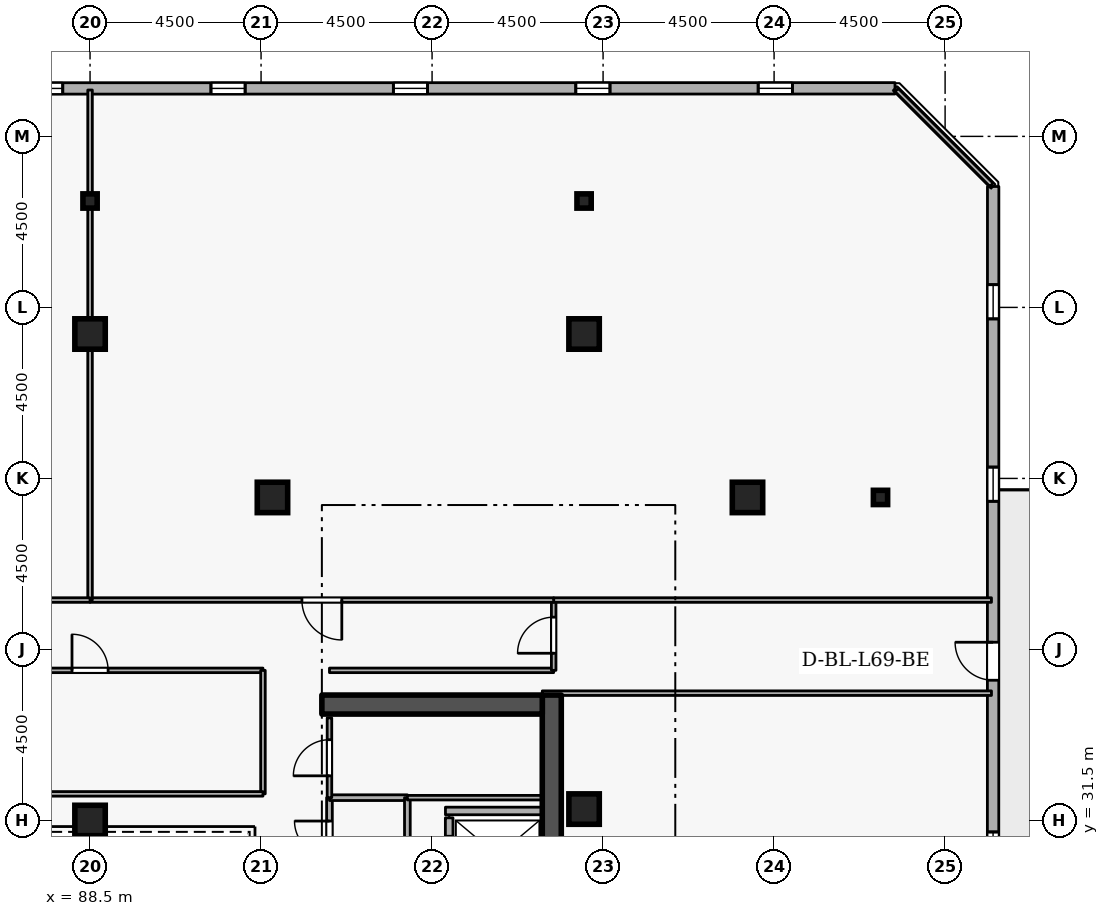
"""IFC4 building model, lengths in metres.
Left out: names, types, materials, properties, quantities, classifications, styles, units other than length and angle.
Written with IfcOpenShell. Run it as: python <this file> out.ifc"""

import sys

from ifc_helpers import new_model, si_unit, direction, frame, frame_2d, origin, origin_2d, place, context, subcontext, project, spatial, rectangle, i_section, extrude, element, fill, save


model = new_model("IFC4")
c1 = context("Model", 3, precision=1e-05, world=origin(), true_north=direction((0.0, 1.0)))
c2 = subcontext(c1, "Body", "Model", "MODEL_VIEW")
j1 = project(units=[si_unit("LENGTHUNIT", "METRE"), si_unit("PLANEANGLEUNIT", "RADIAN")], contexts=[c1])
p1 = place(None, origin())
s1 = spatial("IfcSite", under=j1, at=p1, CompositionType="ELEMENT")
p2 = place(p1, origin())
s2 = spatial("IfcBuilding", under=s1, at=p2, CompositionType="ELEMENT")
p3 = place(p2, frame((0.0, 0.0, 258.3)))
s3 = spatial("IfcBuildingStorey", under=s2, at=p3, CompositionType="ELEMENT", Elevation=258.3)
p4 = place(p3, frame((100.65, 19.2, 0.0), z_axis=(0.0, 0.0, 1.0), x_axis=(0.0, 1.0, 0.0)))
e1 = element("IfcWall", 1, at=p4, inside=s3, PredefinedType="SHEAR", context=c2, shape_type="SweptSolid", body=[
    extrude(rectangle(XDim=15.6, YDim=0.5, at=frame_2d((7.8, 0.0))), origin(), (0.0, 0.0, 1.0), 3.6),
])
p5 = place(p3, frame((94.6, 34.55, 0.0), z_axis=(0.0, 0.0, 1.0), x_axis=(1.0, 0.0, 0.0)))
e2 = element("IfcWall", 2, at=p5, inside=s3, PredefinedType="SHEAR", context=c2, shape_type="SweptSolid", body=[
    extrude(rectangle(XDim=5.8, YDim=0.5, at=frame_2d((2.9, 0.0))), origin(), (0.0, 0.0, 1.0), 3.6),
])
for number, where, z_axis, x_axis in (
    (3, (105.8, 40.0, 0.0), (0.0, 0.0, 1.0), (1.0, 0.0, 0.0)),
    (4, (101.5, 44.3, 0.0), (0.0, 0.0, 1.0), (1.0, 0.0, 0.0)),
    (5, (88.5, 44.3, 0.0), (0.0, 0.0, 1.0), (1.0, 0.0, 0.0)),
    (6, (93.3, 40.0, 0.0), (0.0, 0.0, 1.0), (1.0, 0.0, 0.0)),
    (7, (101.5, 31.8, 0.0), (0.0, 0.0, 1.0), (1.0, 0.0, 0.0)),
    (8, (88.5, 31.5, 0.0), (0.0, 0.0, 1.0), (1.0, 0.0, 0.0)),
):
    element("IfcColumn", number, at=place(p3, frame(where, z_axis=z_axis, x_axis=x_axis)), inside=s3, PredefinedType="COLUMN", context=c2, shape_type="SweptSolid", body=[
        extrude(rectangle(XDim=0.8, YDim=0.8, at=origin_2d()), origin(), (0.0, 0.0, 1.0), 3.6),
    ])
for number, where, z_axis, x_axis in (
    (9, (109.3, 40.0, 0.0), (0.0, 0.0, 1.0), (1.0, 0.0, 0.0)),
    (10, (101.5, 47.8, 0.0), (0.0, 0.0, 1.0), (1.0, 0.0, 0.0)),
    (11, (88.5, 47.8, 0.0), (0.0, 0.0, 1.0), (1.0, 0.0, 0.0)),
):
    element("IfcColumn", number, at=place(p3, frame(where, z_axis=z_axis, x_axis=x_axis)), inside=s3, PredefinedType="COLUMN", context=c2, shape_type="SweptSolid", body=[
        extrude(i_section(OverallWidth=0.375, OverallDepth=0.375, WebThickness=0.017, FlangeThickness=0.027, FilletRadius=0.015, at=origin_2d()), origin(), (0.0, 0.0, 1.0), 3.6),
    ])
p6 = place(p3, frame((112.26, 13.198, 0.0), z_axis=(0.0, 0.0, 1.0), x_axis=(0.000132597301, 0.999999991209, 0.0)))
e12 = element("IfcWall", 12, at=p6, inside=s3, PredefinedType="STANDARD", context=c2, shape_type="SweptSolid", body=[
    extrude(rectangle(XDim=34.983, YDim=0.3, at=frame_2d((17.492, 0.0))), origin(), (0.0, 0.0, 1.0), 2.7),
])
p7 = place(p6, frame((21.992, 0.0, 0.0)))
e13 = element("IfcOpeningElement", 13, at=p7, cuts=e12, PredefinedType="OPENING", context=c2, shape_type="SweptSolid", body=[
    extrude(rectangle(XDim=1.0, YDim=2.08, at=frame_2d((0.5, 1.04))), frame((0.0, 0.16, 0.0), z_axis=(0.0, -1.0, 0.0), x_axis=(1.0, 0.0, 0.0)), (0.0, 0.0, 1.0), 0.32),
])
p8 = place(p6, frame((7.5, 0.0, 0.72)))
e14 = element("IfcOpeningElement", 14, at=p8, cuts=e12, PredefinedType="OPENING", context=c2, shape_type="SweptSolid", body=[
    extrude(rectangle(XDim=0.9, YDim=1.75, at=frame_2d((0.45, 0.875))), frame((0.0, 0.16, 0.0), z_axis=(0.0, -1.0, 0.0), x_axis=(1.0, 0.0, 0.0)), (0.0, 0.0, 1.0), 0.32),
])
p9 = place(p6, frame((12.3, 0.0, 0.72)))
e15 = element("IfcOpeningElement", 15, at=p9, cuts=e12, PredefinedType="OPENING", context=c2, shape_type="SweptSolid", body=[
    extrude(rectangle(XDim=0.9, YDim=1.75, at=frame_2d((0.45, 0.875))), frame((0.0, 0.16, 0.0), z_axis=(0.0, -1.0, 0.0), x_axis=(1.0, 0.0, 0.0)), (0.0, 0.0, 1.0), 0.32),
])
p10 = place(p6, frame((17.1, 0.0, 0.72)))
e16 = element("IfcOpeningElement", 16, at=p10, cuts=e12, PredefinedType="OPENING", context=c2, shape_type="SweptSolid", body=[
    extrude(rectangle(XDim=0.9, YDim=1.75, at=frame_2d((0.45, 0.875))), frame((0.0, 0.16, 0.0), z_axis=(0.0, -1.0, 0.0), x_axis=(1.0, 0.0, 0.0)), (0.0, 0.0, 1.0), 0.32),
])
p11 = place(p6, frame((26.7, 0.0, 0.72)))
e17 = element("IfcOpeningElement", 17, at=p11, cuts=e12, PredefinedType="OPENING", context=c2, shape_type="SweptSolid", body=[
    extrude(rectangle(XDim=0.9, YDim=1.75, at=frame_2d((0.45, 0.875))), frame((0.0, 0.16, 0.0), z_axis=(0.0, -1.0, 0.0), x_axis=(1.0, 0.0, 0.0)), (0.0, 0.0, 1.0), 0.32),
])
p12 = place(p6, frame((31.5, 0.0, 0.72)))
e18 = element("IfcOpeningElement", 18, at=p12, cuts=e12, PredefinedType="OPENING", context=c2, shape_type="SweptSolid", body=[
    extrude(rectangle(XDim=0.9, YDim=1.75, at=frame_2d((0.45, 0.875))), frame((0.0, 0.16, 0.0), z_axis=(0.0, -1.0, 0.0), x_axis=(1.0, 0.0, 0.0)), (0.0, 0.0, 1.0), 0.32),
])
p13 = place(p3, frame((109.681, 50.765, 0.0), z_axis=(0.0, 0.0, 1.0), x_axis=(-0.999999991209, -0.000132597301, 0.0)))
e19 = element("IfcWall", 19, at=p13, inside=s3, PredefinedType="STANDARD", context=c2, shape_type="SweptSolid", body=[
    extrude(rectangle(XDim=34.983, YDim=0.3, at=frame_2d((17.492, 0.0))), origin(), (0.0, 0.0, 1.0), 2.7),
])
p14 = place(p13, frame((2.7, 0.0, 0.72)))
e20 = element("IfcOpeningElement", 20, at=p14, cuts=e19, PredefinedType="OPENING", context=c2, shape_type="SweptSolid", body=[
    extrude(rectangle(XDim=0.9, YDim=1.75, at=frame_2d((0.45, 0.875))), frame((0.0, 0.16, 0.0), z_axis=(0.0, -1.0, 0.0), x_axis=(1.0, 0.0, 0.0)), (0.0, 0.0, 1.0), 0.32),
])
p15 = place(p13, frame((7.5, 0.0, 0.72)))
e21 = element("IfcOpeningElement", 21, at=p15, cuts=e19, PredefinedType="OPENING", context=c2, shape_type="SweptSolid", body=[
    extrude(rectangle(XDim=0.9, YDim=1.75, at=frame_2d((0.45, 0.875))), frame((0.0, 0.16, 0.0), z_axis=(0.0, -1.0, 0.0), x_axis=(1.0, 0.0, 0.0)), (0.0, 0.0, 1.0), 0.32),
])
p16 = place(p13, frame((12.3, 0.0, 0.72)))
e22 = element("IfcOpeningElement", 22, at=p16, cuts=e19, PredefinedType="OPENING", context=c2, shape_type="SweptSolid", body=[
    extrude(rectangle(XDim=0.9, YDim=1.75, at=frame_2d((0.45, 0.875))), frame((0.0, 0.16, 0.0), z_axis=(0.0, -1.0, 0.0), x_axis=(1.0, 0.0, 0.0)), (0.0, 0.0, 1.0), 0.32),
])
p17 = place(p13, frame((17.1, 0.0, 0.72)))
e23 = element("IfcOpeningElement", 23, at=p17, cuts=e19, PredefinedType="OPENING", context=c2, shape_type="SweptSolid", body=[
    extrude(rectangle(XDim=0.9, YDim=1.75, at=frame_2d((0.45, 0.875))), frame((0.0, 0.16, 0.0), z_axis=(0.0, -1.0, 0.0), x_axis=(1.0, 0.0, 0.0)), (0.0, 0.0, 1.0), 0.32),
])
p18 = place(p13, frame((21.9, 0.0, 0.72)))
e24 = element("IfcOpeningElement", 24, at=p18, cuts=e19, PredefinedType="OPENING", context=c2, shape_type="SweptSolid", body=[
    extrude(rectangle(XDim=0.9, YDim=1.75, at=frame_2d((0.45, 0.875))), frame((0.0, 0.16, 0.0), z_axis=(0.0, -1.0, 0.0), x_axis=(1.0, 0.0, 0.0)), (0.0, 0.0, 1.0), 0.32),
])
p19 = place(p13, frame((26.7, 0.0, 0.72)))
e25 = element("IfcOpeningElement", 25, at=p19, cuts=e19, PredefinedType="OPENING", context=c2, shape_type="SweptSolid", body=[
    extrude(rectangle(XDim=0.9, YDim=1.75, at=frame_2d((0.45, 0.875))), frame((0.0, 0.16, 0.0), z_axis=(0.0, -1.0, 0.0), x_axis=(1.0, 0.0, 0.0)), (0.0, 0.0, 1.0), 0.32),
])
p20 = place(p13, frame((31.5, 0.0, 0.72)))
e26 = element("IfcOpeningElement", 26, at=p20, cuts=e19, PredefinedType="OPENING", context=c2, shape_type="SweptSolid", body=[
    extrude(rectangle(XDim=0.9, YDim=1.75, at=frame_2d((0.45, 0.875))), frame((0.0, 0.16, 0.0), z_axis=(0.0, -1.0, 0.0), x_axis=(1.0, 0.0, 0.0)), (0.0, 0.0, 1.0), 0.32),
])
p21 = place(p3, frame((97.95, 31.57, 0.0), z_axis=(0.0, 0.0, 1.0), x_axis=(0.0, -1.0, 0.0)))
e27 = element("IfcWall", 27, at=p21, inside=s3, PredefinedType="STANDARD", context=c2, shape_type="SweptSolid", body=[
    extrude(rectangle(XDim=1.99, YDim=0.2, at=frame_2d((0.995, 0.0))), origin(), (0.0, 0.0, 1.0), 3.34),
])
p22 = place(p21, frame((0.485, 0.0, 0.0)))
e28 = element("IfcOpeningElement", 28, at=p22, cuts=e27, PredefinedType="OPENING", context=c2, shape_type="SweptSolid", body=[
    extrude(rectangle(XDim=1.02, YDim=2.06, at=frame_2d((0.51, 1.03))), frame((0.0, 0.11, 0.0), z_axis=(0.0, -1.0, 0.0), x_axis=(1.0, 0.0, 0.0)), (0.0, 0.0, 1.0), 0.22),
])
p23 = place(p3, frame((97.852, 31.75, 0.0), z_axis=(0.0, 0.0, 1.0), x_axis=(1.0, 0.0, 0.0)))
e29 = element("IfcWall", 29, at=p23, inside=s3, PredefinedType="STANDARD", context=c2, shape_type="SweptSolid", body=[
    extrude(rectangle(XDim=2.536, YDim=0.2, at=frame_2d((1.268, 0.0))), origin(), (0.0, 0.0, 1.0), 3.34),
])
p24 = place(p3, frame((94.8, 29.95, 0.0), z_axis=(0.0, 0.0, 1.0), x_axis=(0.0, 1.0, 0.0)))
e30 = element("IfcWall", 30, at=p24, inside=s3, PredefinedType="PARTITIONING", context=c2, shape_type="SweptSolid", body=[
    extrude(rectangle(XDim=2.15, YDim=0.15, at=frame_2d((1.075, 0.0))), origin(), (0.0, 0.0, 1.0), 3.34),
])
p25 = place(p24, frame((0.615, 0.0, 0.0)))
e31 = element("IfcOpeningElement", 31, at=p25, cuts=e30, PredefinedType="OPENING", context=c2, shape_type="SweptSolid", body=[
    extrude(rectangle(XDim=0.92, YDim=2.08, at=frame_2d((0.46, 1.04))), frame((0.0, 0.085, 0.0), z_axis=(0.0, -1.0, 0.0), x_axis=(1.0, 0.0, 0.0)), (0.0, 0.0, 1.0), 0.17),
])
p26 = place(p3, frame((94.8, 32.1, 0.0), z_axis=(0.0, 0.0, 1.0), x_axis=(1.0, 0.0, 0.0)))
e32 = element("IfcWall", 32, at=p26, inside=s3, PredefinedType="PARTITIONING", context=c2, shape_type="SweptSolid", body=[
    extrude(rectangle(XDim=2.05, YDim=0.15, at=frame_2d((1.025, 0.0))), origin(), (0.0, 0.0, 1.0), 3.34),
])
p27 = place(p3, frame((96.85, 32.1, 0.0), z_axis=(0.0, 0.0, 1.0), x_axis=(0.0, -1.0, 0.0)))
e33 = element("IfcWall", 33, at=p27, inside=s3, PredefinedType="PARTITIONING", context=c2, shape_type="SweptSolid", body=[
    extrude(rectangle(XDim=2.15, YDim=0.15, at=frame_2d((1.075, 0.0))), origin(), (0.0, 0.0, 1.0), 3.34),
])
p28 = place(p3, frame((94.8, 32.1, 0.0), z_axis=(0.0, 0.0, 1.0), x_axis=(0.0, 1.0, 0.0)))
e34 = element("IfcWall", 34, at=p28, inside=s3, PredefinedType="PARTITIONING", context=c2, shape_type="SweptSolid", body=[
    extrude(rectangle(XDim=2.1, YDim=0.12, at=frame_2d((1.05, 0.0))), origin(), (0.0, 0.0, 1.0), 3.34),
])
p29 = place(p28, frame((0.575, 0.0, 0.0)))
e35 = element("IfcOpeningElement", 35, at=p29, cuts=e34, PredefinedType="OPENING", context=c2, shape_type="SweptSolid", body=[
    extrude(rectangle(XDim=0.95, YDim=2.1, at=frame_2d((0.475, 1.05))), frame((0.0, 0.07, 0.0), z_axis=(0.0, -1.0, 0.0), x_axis=(1.0, 0.0, 0.0)), (0.0, 0.0, 1.0), 0.14),
])
p30 = place(p3, frame((100.4, 32.1, 0.0), z_axis=(0.0, 0.0, 1.0), x_axis=(-1.0, 0.0, 0.0)))
e36 = element("IfcWall", 36, at=p30, inside=s3, PredefinedType="PARTITIONING", context=c2, shape_type="SweptSolid", body=[
    extrude(rectangle(XDim=3.55, YDim=0.12, at=frame_2d((1.775, 0.0))), origin(), (0.0, 0.0, 1.0), 3.34),
])
p31 = place(p3, frame((94.8, 35.45, 0.0), z_axis=(0.0, 0.0, 1.0), x_axis=(1.0, 0.0, 0.0)))
e37 = element("IfcWall", 37, at=p31, inside=s3, PredefinedType="PARTITIONING", context=c2, shape_type="SweptSolid", body=[
    extrude(rectangle(XDim=5.9, YDim=0.12, at=frame_2d((2.95, 0.0))), origin(), (0.0, 0.0, 1.0), 3.34),
])
p32 = place(p3, frame((100.7, 35.45, 0.0), z_axis=(0.0, 0.0, 1.0), x_axis=(0.0, 1.0, 0.0)))
e38 = element("IfcWall", 38, at=p32, inside=s3, PredefinedType="PARTITIONING", context=c2, shape_type="SweptSolid", body=[
    extrude(rectangle(XDim=1.85, YDim=0.12, at=frame_2d((0.925, 0.0))), origin(), (0.0, 0.0, 1.0), 3.34),
])
p33 = place(p32, frame((0.45, 0.0, 0.0)))
e39 = element("IfcOpeningElement", 39, at=p33, cuts=e38, PredefinedType="OPENING", context=c2, shape_type="SweptSolid", body=[
    extrude(rectangle(XDim=0.95, YDim=2.1, at=frame_2d((0.475, 1.05))), frame((0.0, 0.07, 0.0), z_axis=(0.0, -1.0, 0.0), x_axis=(1.0, 0.0, 0.0)), (0.0, 0.0, 1.0), 0.14),
])
p34 = place(p3, frame((100.7, 37.3, 0.0), z_axis=(0.0, 0.0, 1.0), x_axis=(1.0, 0.0, 0.0)))
e40 = element("IfcWall", 40, at=p34, inside=s3, PredefinedType="PARTITIONING", context=c2, shape_type="SweptSolid", body=[
    extrude(rectangle(XDim=11.52, YDim=0.12, at=frame_2d((5.76, 0.0))), origin(), (0.0, 0.0, 1.0), 3.34),
])
p35 = place(p3, frame((112.22, 34.85, 0.0), z_axis=(0.0, 0.0, 1.0), x_axis=(-1.0, 0.0, 0.0)))
e41 = element("IfcWall", 41, at=p35, inside=s3, PredefinedType="PARTITIONING", context=c2, shape_type="SweptSolid", body=[
    extrude(rectangle(XDim=11.82, YDim=0.12, at=frame_2d((5.91, 0.0))), origin(), (0.0, 0.0, 1.0), 2.545),
])
p36 = place(p3, frame((100.7, 37.3, 0.0), z_axis=(0.0, 0.0, 1.0), x_axis=(-1.0, 0.0, 0.0)))
e42 = element("IfcWall", 42, at=p36, inside=s3, PredefinedType="PARTITIONING", context=c2, shape_type="SweptSolid", body=[
    extrude(rectangle(XDim=12.2, YDim=0.12, at=frame_2d((6.1, 0.0))), origin(), (0.0, 0.0, 1.0), 3.34),
])
p37 = place(p36, frame((5.575, 0.0, 0.0)))
e43 = element("IfcOpeningElement", 43, at=p37, cuts=e42, PredefinedType="OPENING", context=c2, shape_type="SweptSolid", body=[
    extrude(rectangle(XDim=1.05, YDim=2.1, at=frame_2d((0.525, 1.05))), frame((0.0, 0.07, 0.0), z_axis=(0.0, -1.0, 0.0), x_axis=(1.0, 0.0, 0.0)), (0.0, 0.0, 1.0), 0.14),
])
p38 = place(p3, frame((88.5, 37.3, 0.0), z_axis=(0.0, 0.0, 1.0), x_axis=(0.0, 1.0, 0.0)))
e44 = element("IfcWall", 44, at=p38, inside=s3, PredefinedType="PARTITIONING", context=c2, shape_type="SweptSolid", body=[
    extrude(rectangle(XDim=13.42, YDim=0.12, at=frame_2d((6.71, 0.0))), origin(), (0.0, 0.0, 1.0), 2.932),
])
p39 = place(p3, frame((109.725, 50.72, 0.0), z_axis=(0.0, 0.0, 1.0), x_axis=(0.707106781187, -0.707106781187, 0.0)))
e45 = element("IfcWall", 45, at=p39, inside=s3, PredefinedType="PARTITIONING", context=c2, shape_type="SweptSolid", body=[
    extrude(rectangle(XDim=3.528, YDim=0.12, at=frame_2d((1.764, 0.0))), origin(), (0.0, 0.0, 1.0), 3.34),
])
p40 = place(p3, frame((88.5, 37.3, 0.0), z_axis=(0.0, 0.0, 1.0), x_axis=(-1.0, 0.0, 0.0)))
e46 = element("IfcWall", 46, at=p40, inside=s3, PredefinedType="PARTITIONING", context=c2, shape_type="SweptSolid", body=[
    extrude(rectangle(XDim=6.3, YDim=0.12, at=frame_2d((3.15, 0.0))), origin(), (0.0, 0.0, 1.0), 3.34),
])
p41 = place(p40, frame((2.625, 0.0, 0.0)))
e47 = element("IfcOpeningElement", 47, at=p41, cuts=e46, PredefinedType="OPENING", context=c2, shape_type="SweptSolid", body=[
    extrude(rectangle(XDim=1.05, YDim=2.1, at=frame_2d((0.525, 1.05))), frame((0.0, 0.07, 0.0), z_axis=(0.0, -1.0, 0.0), x_axis=(1.0, 0.0, 0.0)), (0.0, 0.0, 1.0), 0.14),
])
p42 = place(p3, frame((83.95, 35.45, 0.0), z_axis=(0.0, 0.0, 1.0), x_axis=(1.0, 0.0, 0.0)))
e48 = element("IfcWall", 48, at=p42, inside=s3, PredefinedType="PARTITIONING", context=c2, shape_type="SweptSolid", body=[
    extrude(rectangle(XDim=9.1, YDim=0.12, at=frame_2d((4.55, 0.0))), origin(), (0.0, 0.0, 1.0), 3.34),
])
p43 = place(p42, frame((4.075, 0.0, 0.0)))
e49 = element("IfcOpeningElement", 49, at=p43, cuts=e48, PredefinedType="OPENING", context=c2, shape_type="SweptSolid", body=[
    extrude(rectangle(XDim=0.95, YDim=2.1, at=frame_2d((0.475, 1.05))), frame((0.0, 0.07, 0.0), z_axis=(0.0, -1.0, 0.0), x_axis=(1.0, 0.0, 0.0)), (0.0, 0.0, 1.0), 0.14),
])
p44 = place(p3, frame((93.05, 35.45, 0.0), z_axis=(0.0, 0.0, 1.0), x_axis=(0.0, -1.0, 0.0)))
e50 = element("IfcWall", 50, at=p44, inside=s3, PredefinedType="PARTITIONING", context=c2, shape_type="SweptSolid", body=[
    extrude(rectangle(XDim=3.25, YDim=0.12, at=frame_2d((1.625, 0.0))), origin(), (0.0, 0.0, 1.0), 3.34),
])
p45 = place(p3, frame((93.05, 32.2, 0.0), z_axis=(0.0, 0.0, 1.0), x_axis=(-1.0, 0.0, 0.0)))
e51 = element("IfcWall", 51, at=p45, inside=s3, PredefinedType="PARTITIONING", context=c2, shape_type="SweptSolid", body=[
    extrude(rectangle(XDim=9.1, YDim=0.12, at=frame_2d((4.55, 0.0))), origin(), (0.0, 0.0, 1.0), 3.34),
])
p46 = place(p7, origin())
e52 = element("IfcDoor", 52, at=p46, inside=s3, OperationType="SINGLE_SWING_RIGHT", PredefinedType="DOOR", context=c2, shape_type="SweptSolid", body=[
    extrude(rectangle(XDim=1.0, YDim=2.08, at=frame_2d((0.5, 1.04))), frame((0.0, 0.025, 0.0), z_axis=(0.0, -1.0, 0.0), x_axis=(1.0, 0.0, 0.0)), (0.0, 0.0, 1.0), 0.05),
])
fill(e13, e52)
p47 = place(p10, origin())
e53 = element("IfcWindow", 53, at=p47, inside=s3, PartitioningType="SINGLE_PANEL", PredefinedType="WINDOW", context=c2, shape_type="SweptSolid", body=[
    extrude(rectangle(XDim=0.9, YDim=1.75, at=frame_2d((0.45, 0.875))), frame((0.0, 0.03, 0.0), z_axis=(0.0, -1.0, 0.0), x_axis=(1.0, 0.0, 0.0)), (0.0, 0.0, 1.0), 0.06),
])
fill(e16, e53)
p48 = place(p11, origin())
e54 = element("IfcWindow", 54, at=p48, inside=s3, PartitioningType="SINGLE_PANEL", PredefinedType="WINDOW", context=c2, shape_type="SweptSolid", body=[
    extrude(rectangle(XDim=0.9, YDim=1.75, at=frame_2d((0.45, 0.875))), frame((0.0, 0.03, 0.0), z_axis=(0.0, -1.0, 0.0), x_axis=(1.0, 0.0, 0.0)), (0.0, 0.0, 1.0), 0.06),
])
fill(e17, e54)
p49 = place(p12, origin())
e55 = element("IfcWindow", 55, at=p49, inside=s3, PartitioningType="SINGLE_PANEL", PredefinedType="WINDOW", context=c2, shape_type="SweptSolid", body=[
    extrude(rectangle(XDim=0.9, YDim=1.75, at=frame_2d((0.45, 0.875))), frame((0.0, 0.03, 0.0), z_axis=(0.0, -1.0, 0.0), x_axis=(1.0, 0.0, 0.0)), (0.0, 0.0, 1.0), 0.06),
])
fill(e18, e55)
p50 = place(p14, origin())
e56 = element("IfcWindow", 56, at=p50, inside=s3, PartitioningType="SINGLE_PANEL", PredefinedType="WINDOW", context=c2, shape_type="SweptSolid", body=[
    extrude(rectangle(XDim=0.9, YDim=1.75, at=frame_2d((0.45, 0.875))), frame((0.0, 0.03, 0.0), z_axis=(0.0, -1.0, 0.0), x_axis=(1.0, 0.0, 0.0)), (0.0, 0.0, 1.0), 0.06),
])
fill(e20, e56)
p51 = place(p15, origin())
e57 = element("IfcWindow", 57, at=p51, inside=s3, PartitioningType="SINGLE_PANEL", PredefinedType="WINDOW", context=c2, shape_type="SweptSolid", body=[
    extrude(rectangle(XDim=0.9, YDim=1.75, at=frame_2d((0.45, 0.875))), frame((0.0, 0.03, 0.0), z_axis=(0.0, -1.0, 0.0), x_axis=(1.0, 0.0, 0.0)), (0.0, 0.0, 1.0), 0.06),
])
fill(e21, e57)
p52 = place(p16, origin())
e58 = element("IfcWindow", 58, at=p52, inside=s3, PartitioningType="SINGLE_PANEL", PredefinedType="WINDOW", context=c2, shape_type="SweptSolid", body=[
    extrude(rectangle(XDim=0.9, YDim=1.75, at=frame_2d((0.45, 0.875))), frame((0.0, 0.03, 0.0), z_axis=(0.0, -1.0, 0.0), x_axis=(1.0, 0.0, 0.0)), (0.0, 0.0, 1.0), 0.06),
])
fill(e22, e58)
p53 = place(p17, origin())
e59 = element("IfcWindow", 59, at=p53, inside=s3, PartitioningType="SINGLE_PANEL", PredefinedType="WINDOW", context=c2, shape_type="SweptSolid", body=[
    extrude(rectangle(XDim=0.9, YDim=1.75, at=frame_2d((0.45, 0.875))), frame((0.0, 0.03, 0.0), z_axis=(0.0, -1.0, 0.0), x_axis=(1.0, 0.0, 0.0)), (0.0, 0.0, 1.0), 0.06),
])
fill(e23, e59)
p54 = place(p18, origin())
e60 = element("IfcWindow", 60, at=p54, inside=s3, PartitioningType="SINGLE_PANEL", PredefinedType="WINDOW", context=c2, shape_type="SweptSolid", body=[
    extrude(rectangle(XDim=0.9, YDim=1.75, at=frame_2d((0.45, 0.875))), frame((0.0, 0.03, 0.0), z_axis=(0.0, -1.0, 0.0), x_axis=(1.0, 0.0, 0.0)), (0.0, 0.0, 1.0), 0.06),
])
fill(e24, e60)
p55 = place(p25, origin())
e61 = element("IfcDoor", 61, at=p55, inside=s3, OperationType="SINGLE_SWING_RIGHT", PredefinedType="DOOR", context=c2, shape_type="SweptSolid", body=[
    extrude(rectangle(XDim=0.92, YDim=2.08, at=frame_2d((0.46, 1.04))), frame((0.0, 0.025, 0.0), z_axis=(0.0, -1.0, 0.0), x_axis=(1.0, 0.0, 0.0)), (0.0, 0.0, 1.0), 0.05),
])
fill(e31, e61)
p56 = place(p29, origin())
e62 = element("IfcDoor", 62, at=p56, inside=s3, OperationType="SINGLE_SWING_LEFT", PredefinedType="DOOR", context=c2, shape_type="SweptSolid", body=[
    extrude(rectangle(XDim=0.95, YDim=2.1, at=frame_2d((0.475, 1.05))), frame((0.0, 0.025, 0.0), z_axis=(0.0, -1.0, 0.0), x_axis=(1.0, 0.0, 0.0)), (0.0, 0.0, 1.0), 0.05),
])
fill(e35, e62)
p57 = place(p33, origin())
e63 = element("IfcDoor", 63, at=p57, inside=s3, OperationType="SINGLE_SWING_LEFT", PredefinedType="DOOR", context=c2, shape_type="SweptSolid", body=[
    extrude(rectangle(XDim=0.95, YDim=2.1, at=frame_2d((0.475, 1.05))), frame((0.0, 0.025, 0.0), z_axis=(0.0, -1.0, 0.0), x_axis=(1.0, 0.0, 0.0)), (0.0, 0.0, 1.0), 0.05),
])
fill(e39, e63)
p58 = place(p37, origin())
e64 = element("IfcDoor", 64, at=p58, inside=s3, OperationType="SINGLE_SWING_LEFT", PredefinedType="DOOR", context=c2, shape_type="SweptSolid", body=[
    extrude(rectangle(XDim=1.05, YDim=2.1, at=frame_2d((0.525, 1.05))), frame((0.0, 0.025, 0.0), z_axis=(0.0, -1.0, 0.0), x_axis=(1.0, 0.0, 0.0)), (0.0, 0.0, 1.0), 0.05),
])
fill(e43, e64)
p59 = place(p43, origin())
e65 = element("IfcDoor", 65, at=p59, inside=s3, OperationType="SINGLE_SWING_LEFT", PredefinedType="DOOR", context=c2, shape_type="SweptSolid", body=[
    extrude(rectangle(XDim=0.95, YDim=2.1, at=frame_2d((0.475, 1.05))), frame((0.0, 0.025, 0.0), z_axis=(0.0, -1.0, 0.0), x_axis=(1.0, 0.0, 0.0)), (0.0, 0.0, 1.0), 0.05),
])
fill(e49, e65)
save(model, sys.argv[1])
